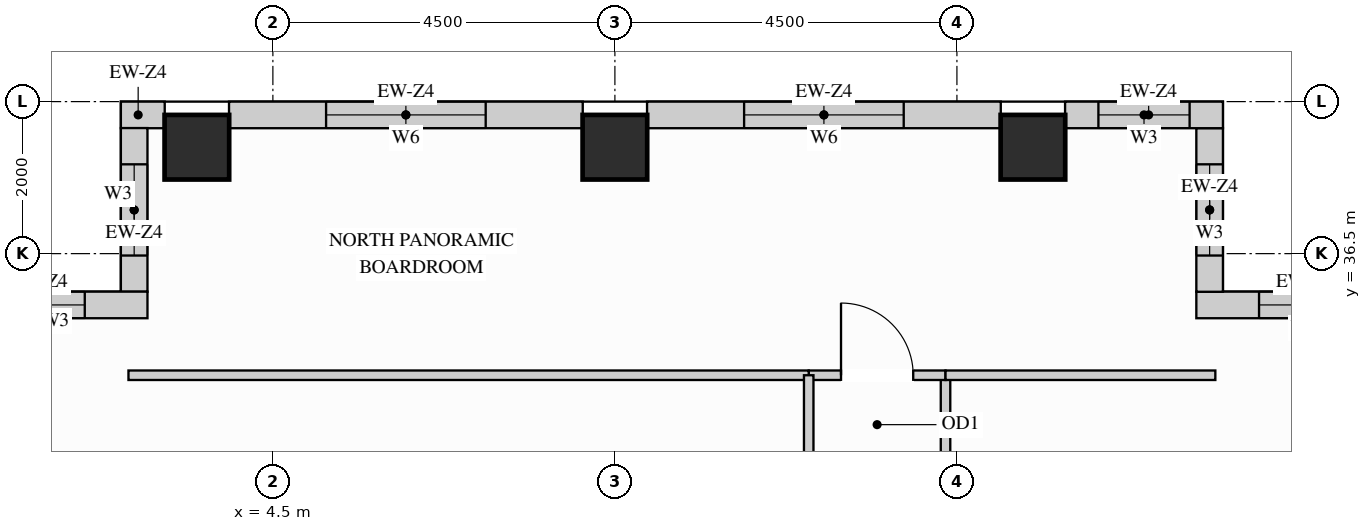
"""IFC4 building model, lengths in metres.
Left out: names, types, materials, properties, quantities, classifications, styles, units other than length and angle.
Written with IfcOpenShell. Run it as: python <this file> out.ifc"""

import sys

from ifc_helpers import new_model, si_unit, direction, frame, frame_2d, origin, origin_2d, place, context, subcontext, project, spatial, rectangle, extrude, source, transform, mapped, element, fill, save


model = new_model("IFC4")
c1 = context("Model", 3, precision=1e-05, world=origin(), true_north=direction((0.0, 1.0)))
c2 = subcontext(c1, "Body", "Model", "MODEL_VIEW")
j1 = project(units=[si_unit("LENGTHUNIT", "METRE"), si_unit("PLANEANGLEUNIT", "RADIAN")], contexts=[c1])
p1 = place(None, origin())
s1 = spatial("IfcSite", under=j1, at=p1, CompositionType="ELEMENT")
p2 = place(p1, origin())
s2 = spatial("IfcBuilding", under=s1, at=p2, CompositionType="ELEMENT")
p3 = place(p2, frame((0.0, 0.0, 244.8)))
s3 = spatial("IfcBuildingStorey", under=s2, at=p3, CompositionType="ELEMENT", Elevation=244.8)
m1 = source(origin(), c2, "Body", "SweptSolid", [
    extrude(rectangle(XDim=0.85, YDim=0.85, at=origin_2d()), origin(), (0.0, 0.0, 1.0), 3.4),
])
for number, where, z_axis, x_axis in (
    (1, (14.5, 37.9, 0.0), (0.0, 0.0, 1.0), (1.0, 0.0, 0.0)),
    (2, (3.5, 37.9, 0.0), (0.0, 0.0, 1.0), (1.0, 0.0, 0.0)),
    (3, (9.0, 37.9, 0.0), (0.0, 0.0, 1.0), (1.0, 0.0, 0.0)),
):
    element("IfcColumn", number, at=place(p3, frame(where, z_axis=z_axis, x_axis=x_axis)), inside=s3, PredefinedType="COLUMN", context=c2, shape_type="MappedRepresentation", body=[
        mapped(m1, transform((0.0, 0.0, 0.0), x_axis=(1.0, 0.0, 0.0), y_axis=(0.0, 1.0, 0.0), z_axis=(0.0, 0.0, 1.0))),
    ])
p4 = place(p3, frame((19.5, 35.825, 0.0), z_axis=(0.0, 0.0, 1.0), x_axis=(-1.0, 0.0, 0.0)))
e4 = element("IfcWall", 4, at=p4, inside=s3, PredefinedType="SOLIDWALL", context=c2, shape_type="SweptSolid", body=[
    extrude(rectangle(XDim=2.85, YDim=0.35, at=frame_2d((1.425, 0.0))), origin(), (0.0, 0.0, 1.0), 3.385),
])
p5 = place(p4, frame((0.825, 0.0, 0.78)))
e5 = element("IfcOpeningElement", 5, at=p5, cuts=e4, PredefinedType="OPENING", context=c2, shape_type="SweptSolid", body=[
    extrude(rectangle(XDim=1.2, YDim=2.25, at=frame_2d((0.6, 1.125))), frame((0.0, 0.185, 0.0), z_axis=(0.0, -1.0, 0.0), x_axis=(1.0, 0.0, 0.0)), (0.0, 0.0, 1.0), 0.37),
])
p6 = place(p3, frame((16.825, 35.998, 0.0), z_axis=(0.0, 0.0, 1.0), x_axis=(0.0, 1.0, 0.0)))
e6 = element("IfcWall", 6, at=p6, inside=s3, PredefinedType="SOLIDWALL", context=c2, shape_type="SweptSolid", body=[
    extrude(rectangle(XDim=2.154, YDim=0.35, at=frame_2d((1.077, 0.0))), origin(), (0.0, 0.0, 1.0), 3.385),
])
p7 = place(p6, frame((0.477, 0.0, 0.78)))
e7 = element("IfcOpeningElement", 7, at=p7, cuts=e6, PredefinedType="OPENING", context=c2, shape_type="SweptSolid", body=[
    extrude(rectangle(XDim=1.2, YDim=2.25, at=frame_2d((0.6, 1.125))), frame((0.0, 0.185, 0.0), z_axis=(0.0, -1.0, 0.0), x_axis=(1.0, 0.0, 0.0)), (0.0, 0.0, 1.0), 0.37),
])
p8 = place(p3, frame((17.0, 38.325, 0.0), z_axis=(0.0, 0.0, 1.0), x_axis=(-1.0, 0.0, 0.0)))
e8 = element("IfcWall", 8, at=p8, inside=s3, PredefinedType="SOLIDWALL", context=c2, shape_type="SweptSolid", body=[
    extrude(rectangle(XDim=2.077, YDim=0.35, at=frame_2d((1.039, 0.0))), origin(), (0.0, 0.0, 1.0), 3.385),
])
p9 = place(p8, frame((0.438, 0.0, 0.78)))
e9 = element("IfcOpeningElement", 9, at=p9, cuts=e8, PredefinedType="OPENING", context=c2, shape_type="SweptSolid", body=[
    extrude(rectangle(XDim=1.2, YDim=2.25, at=frame_2d((0.6, 1.125))), frame((0.0, 0.185, 0.0), z_axis=(0.0, -1.0, 0.0), x_axis=(1.0, 0.0, 0.0)), (0.0, 0.0, 1.0), 0.37),
])
p10 = place(p3, frame((14.077, 38.325, 0.0), z_axis=(0.0, 0.0, 1.0), x_axis=(-1.0, 0.0, 0.0)))
e10 = element("IfcWall", 10, at=p10, inside=s3, PredefinedType="SOLIDWALL", context=c2, shape_type="SweptSolid", body=[
    extrude(rectangle(XDim=4.654, YDim=0.35, at=frame_2d((2.327, 0.0))), origin(), (0.0, 0.0, 1.0), 3.385),
])
p11 = place(p10, frame((1.277, 0.0, 0.78)))
e11 = element("IfcOpeningElement", 11, at=p11, cuts=e10, PredefinedType="OPENING", context=c2, shape_type="SweptSolid", body=[
    extrude(rectangle(XDim=2.1, YDim=2.25, at=frame_2d((1.05, 1.125))), frame((0.0, 0.185, 0.0), z_axis=(0.0, -1.0, 0.0), x_axis=(1.0, 0.0, 0.0)), (0.0, 0.0, 1.0), 0.37),
])
p12 = place(p3, frame((8.577, 38.325, 0.0), z_axis=(0.0, 0.0, 1.0), x_axis=(-1.0, 0.0, 0.0)))
e12 = element("IfcWall", 12, at=p12, inside=s3, PredefinedType="SOLIDWALL", context=c2, shape_type="SweptSolid", body=[
    extrude(rectangle(XDim=4.654, YDim=0.35, at=frame_2d((2.327, 0.0))), origin(), (0.0, 0.0, 1.0), 3.385),
])
p13 = place(p12, frame((1.277, 0.0, 0.78)))
e13 = element("IfcOpeningElement", 13, at=p13, cuts=e12, PredefinedType="OPENING", context=c2, shape_type="SweptSolid", body=[
    extrude(rectangle(XDim=2.1, YDim=2.25, at=frame_2d((1.05, 1.125))), frame((0.0, 0.185, 0.0), z_axis=(0.0, -1.0, 0.0), x_axis=(1.0, 0.0, 0.0)), (0.0, 0.0, 1.0), 0.37),
])
m2 = source(origin(), c2, "Body", "SweptSolid", [
    extrude(rectangle(XDim=0.577, YDim=0.35, at=frame_2d((0.289, 0.0))), origin(), (0.0, 0.0, 1.0), 3.385),
])
p14 = place(p3, frame((3.077, 38.325, 0.0), z_axis=(0.0, 0.0, 1.0), x_axis=(-1.0, 0.0, 0.0)))
e14 = element("IfcWall", 14, at=p14, inside=s3, PredefinedType="SOLIDWALL", context=c2, shape_type="MappedRepresentation", body=[
    mapped(m2, transform((0.0, 0.0, 0.0), x_axis=(1.0, 0.0, 0.0), y_axis=(0.0, 1.0, 0.0), z_axis=(0.0, 0.0, 1.0))),
])
p15 = place(p3, frame((2.675, 38.152, 0.0), z_axis=(0.0, 0.0, 1.0), x_axis=(0.0, -1.0, 0.0)))
e15 = element("IfcWall", 15, at=p15, inside=s3, PredefinedType="SOLIDWALL", context=c2, shape_type="SweptSolid", body=[
    extrude(rectangle(XDim=2.154, YDim=0.35, at=frame_2d((1.077, 0.0))), origin(), (0.0, 0.0, 1.0), 3.385),
])
p16 = place(p15, frame((0.477, 0.0, 0.78)))
e16 = element("IfcOpeningElement", 16, at=p16, cuts=e15, PredefinedType="OPENING", context=c2, shape_type="SweptSolid", body=[
    extrude(rectangle(XDim=1.2, YDim=2.25, at=frame_2d((0.6, 1.125))), frame((0.0, 0.185, 0.0), z_axis=(0.0, -1.0, 0.0), x_axis=(1.0, 0.0, 0.0)), (0.0, 0.0, 1.0), 0.37),
])
p17 = place(p3, frame((2.85, 35.825, 0.0), z_axis=(0.0, 0.0, 1.0), x_axis=(-1.0, 0.0, 0.0)))
e17 = element("IfcWall", 17, at=p17, inside=s3, PredefinedType="SOLIDWALL", context=c2, shape_type="SweptSolid", body=[
    extrude(rectangle(XDim=2.85, YDim=0.35, at=frame_2d((1.425, 0.0))), origin(), (0.0, 0.0, 1.0), 3.385),
])
p18 = place(p17, frame((0.825, 0.0, 0.78)))
e18 = element("IfcOpeningElement", 18, at=p18, cuts=e17, PredefinedType="OPENING", context=c2, shape_type="SweptSolid", body=[
    extrude(rectangle(XDim=1.2, YDim=2.25, at=frame_2d((0.6, 1.125))), frame((0.0, 0.185, 0.0), z_axis=(0.0, -1.0, 0.0), x_axis=(1.0, 0.0, 0.0)), (0.0, 0.0, 1.0), 0.37),
])
p19 = place(p3, frame((13.35, 31.55, 0.0), z_axis=(0.0, 0.0, 1.0), x_axis=(0.0, 1.0, 0.0)))
e19 = element("IfcWall", 19, at=p19, inside=s3, PredefinedType="PARTITIONING", context=c2, shape_type="SweptSolid", body=[
    extrude(rectangle(XDim=3.35, YDim=0.125, at=frame_2d((1.675, 0.0))), origin(), (0.0, 0.0, 1.0), 3.385),
])
p20 = place(p19, frame((1.2, 0.0, 0.0)))
e20 = element("IfcOpeningElement", 20, at=p20, cuts=e19, PredefinedType="OPENING", context=c2, shape_type="SweptSolid", body=[
    extrude(rectangle(XDim=0.95, YDim=2.15, at=frame_2d((0.475, 1.075))), frame((0.0, 0.073, 0.0), z_axis=(0.0, -1.0, 0.0), x_axis=(1.0, 0.0, 0.0)), (0.0, 0.0, 1.0), 0.145),
])
p21 = place(p3, frame((11.55, 34.9, 0.0), z_axis=(0.0, 0.0, 1.0), x_axis=(1.0, 0.0, 0.0)))
e21 = element("IfcWall", 21, at=p21, inside=s3, PredefinedType="PARTITIONING", context=c2, shape_type="SweptSolid", body=[
    extrude(rectangle(XDim=1.8, YDim=0.125, at=frame_2d((0.9, 0.0))), origin(), (0.0, 0.0, 1.0), 3.385),
])
p22 = place(p21, frame((0.425, 0.0, 0.0)))
e22 = element("IfcOpeningElement", 22, at=p22, cuts=e21, PredefinedType="OPENING", context=c2, shape_type="SweptSolid", body=[
    extrude(rectangle(XDim=0.95, YDim=2.15, at=frame_2d((0.475, 1.075))), frame((0.0, 0.073, 0.0), z_axis=(0.0, -1.0, 0.0), x_axis=(1.0, 0.0, 0.0)), (0.0, 0.0, 1.0), 0.145),
])
m3 = source(origin(), c2, "Body", "SweptSolid", [
    extrude(rectangle(XDim=3.55, YDim=0.125, at=frame_2d((1.775, 0.0))), origin(), (0.0, 0.0, 1.0), 3.385),
])
p23 = place(p3, frame((13.35, 34.9, 0.0), z_axis=(0.0, 0.0, 1.0), x_axis=(1.0, 0.0, 0.0)))
e23 = element("IfcWall", 23, at=p23, inside=s3, PredefinedType="PARTITIONING", context=c2, shape_type="MappedRepresentation", body=[
    mapped(m3, transform((0.0, 0.0, 0.0), x_axis=(1.0, 0.0, 0.0), y_axis=(0.0, 1.0, 0.0), z_axis=(0.0, 0.0, 1.0))),
])
m4 = source(origin(), c2, "Body", "SweptSolid", [
    extrude(rectangle(XDim=8.95, YDim=0.125, at=frame_2d((4.475, 0.0))), origin(), (0.0, 0.0, 1.0), 3.385),
])
p24 = place(p3, frame((2.6, 34.9, 0.0), z_axis=(0.0, 0.0, 1.0), x_axis=(1.0, 0.0, 0.0)))
e24 = element("IfcWall", 24, at=p24, inside=s3, PredefinedType="PARTITIONING", context=c2, shape_type="MappedRepresentation", body=[
    mapped(m4, transform((0.0, 0.0, 0.0), x_axis=(1.0, 0.0, 0.0), y_axis=(0.0, 1.0, 0.0), z_axis=(0.0, 0.0, 1.0))),
])
p25 = place(p3, frame((11.55, 31.55, 0.0), z_axis=(0.0, 0.0, 1.0), x_axis=(0.0, 1.0, 0.0)))
e25 = element("IfcWall", 25, at=p25, inside=s3, PredefinedType="PARTITIONING", context=c2, shape_type="SweptSolid", body=[
    extrude(rectangle(XDim=3.35, YDim=0.125, at=frame_2d((1.675, 0.0))), origin(), (0.0, 0.0, 1.0), 3.385),
])
p26 = place(p25, frame((1.2, 0.0, 0.0)))
e26 = element("IfcOpeningElement", 26, at=p26, cuts=e25, PredefinedType="OPENING", context=c2, shape_type="SweptSolid", body=[
    extrude(rectangle(XDim=0.95, YDim=2.15, at=frame_2d((0.475, 1.075))), frame((0.0, 0.073, 0.0), z_axis=(0.0, -1.0, 0.0), x_axis=(1.0, 0.0, 0.0)), (0.0, 0.0, 1.0), 0.145),
])
m5 = source(origin(), c2, "Body", "SweptSolid", [
    extrude(rectangle(XDim=0.95, YDim=2.15, at=frame_2d((0.475, 1.075))), frame((0.0, 0.025, 0.0), z_axis=(0.0, -1.0, 0.0), x_axis=(1.0, 0.0, 0.0)), (0.0, 0.0, 1.0), 0.05),
])
p27 = place(p22, origin())
e27 = element("IfcDoor", 27, at=p27, inside=s3, OperationType="SINGLE_SWING_LEFT", PredefinedType="DOOR", context=c2, shape_type="MappedRepresentation", body=[
    mapped(m5, transform((0.0, 0.0, 0.0), x_axis=(1.0, 0.0, 0.0), y_axis=(0.0, 1.0, 0.0), z_axis=(0.0, 0.0, 1.0))),
])
fill(e22, e27)
m6 = source(origin(), c2, "Body", "SweptSolid", [
    extrude(rectangle(XDim=1.2, YDim=2.25, at=frame_2d((0.6, 1.125))), frame((0.0, 0.03, 0.0), z_axis=(0.0, -1.0, 0.0), x_axis=(1.0, 0.0, 0.0)), (0.0, 0.0, 1.0), 0.06),
])
p28 = place(p5, origin())
e28 = element("IfcWindow", 28, at=p28, inside=s3, PartitioningType="SINGLE_PANEL", PredefinedType="WINDOW", context=c2, shape_type="MappedRepresentation", body=[
    mapped(m6, transform((0.0, 0.0, 0.0), x_axis=(1.0, 0.0, 0.0), y_axis=(0.0, 1.0, 0.0), z_axis=(0.0, 0.0, 1.0))),
])
fill(e5, e28)
p29 = place(p7, origin())
e29 = element("IfcWindow", 29, at=p29, inside=s3, PartitioningType="SINGLE_PANEL", PredefinedType="WINDOW", context=c2, shape_type="MappedRepresentation", body=[
    mapped(m6, transform((0.0, 0.0, 0.0), x_axis=(1.0, 0.0, 0.0), y_axis=(0.0, 1.0, 0.0), z_axis=(0.0, 0.0, 1.0))),
])
fill(e7, e29)
p30 = place(p9, origin())
e30 = element("IfcWindow", 30, at=p30, inside=s3, PartitioningType="SINGLE_PANEL", PredefinedType="WINDOW", context=c2, shape_type="MappedRepresentation", body=[
    mapped(m6, transform((0.0, 0.0, 0.0), x_axis=(1.0, 0.0, 0.0), y_axis=(0.0, 1.0, 0.0), z_axis=(0.0, 0.0, 1.0))),
])
fill(e9, e30)
p31 = place(p16, origin())
e31 = element("IfcWindow", 31, at=p31, inside=s3, PartitioningType="SINGLE_PANEL", PredefinedType="WINDOW", context=c2, shape_type="MappedRepresentation", body=[
    mapped(m6, transform((0.0, 0.0, 0.0), x_axis=(1.0, 0.0, 0.0), y_axis=(0.0, 1.0, 0.0), z_axis=(0.0, 0.0, 1.0))),
])
fill(e16, e31)
p32 = place(p18, origin())
e32 = element("IfcWindow", 32, at=p32, inside=s3, PartitioningType="SINGLE_PANEL", PredefinedType="WINDOW", context=c2, shape_type="MappedRepresentation", body=[
    mapped(m6, transform((0.0, 0.0, 0.0), x_axis=(1.0, 0.0, 0.0), y_axis=(0.0, 1.0, 0.0), z_axis=(0.0, 0.0, 1.0))),
])
fill(e18, e32)
m7 = source(origin(), c2, "Body", "SweptSolid", [
    extrude(rectangle(XDim=2.1, YDim=2.25, at=frame_2d((1.05, 1.125))), frame((0.0, 0.03, 0.0), z_axis=(0.0, -1.0, 0.0), x_axis=(1.0, 0.0, 0.0)), (0.0, 0.0, 1.0), 0.06),
])
p33 = place(p11, origin())
e33 = element("IfcWindow", 33, at=p33, inside=s3, PartitioningType="SINGLE_PANEL", PredefinedType="WINDOW", context=c2, shape_type="MappedRepresentation", body=[
    mapped(m7, transform((0.0, 0.0, 0.0), x_axis=(1.0, 0.0, 0.0), y_axis=(0.0, 1.0, 0.0), z_axis=(0.0, 0.0, 1.0))),
])
fill(e11, e33)
p34 = place(p13, origin())
e34 = element("IfcWindow", 34, at=p34, inside=s3, PartitioningType="SINGLE_PANEL", PredefinedType="WINDOW", context=c2, shape_type="MappedRepresentation", body=[
    mapped(m7, transform((0.0, 0.0, 0.0), x_axis=(1.0, 0.0, 0.0), y_axis=(0.0, 1.0, 0.0), z_axis=(0.0, 0.0, 1.0))),
])
fill(e13, e34)
save(model, sys.argv[1])
